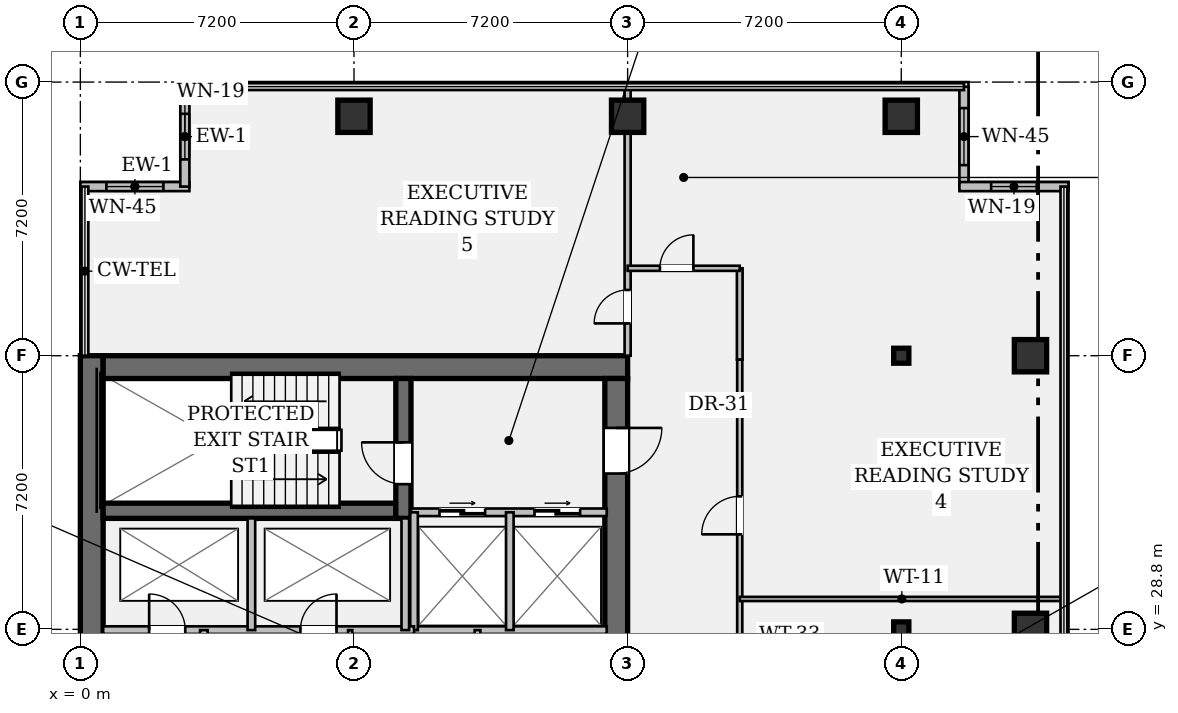
"""IFC4 building model, lengths in metres.
Left out: names, types, materials, properties, quantities, classifications, styles, units other than length and angle.
Written with IfcOpenShell. Run it as: python <this file> out.ifc"""

import sys

from ifc_helpers import new_model, si_unit, direction, frame, frame_2d, origin, origin_2d, place, context, subcontext, project, spatial, rectangle, hollow_rectangle, i_section, extrude, element, fill, save


model = new_model("IFC4")
c1 = context("Model", 3, precision=1e-05, world=origin(), true_north=direction((0.0, 1.0)))
c2 = subcontext(c1, "Body", "Model", "MODEL_VIEW")
j1 = project(units=[si_unit("LENGTHUNIT", "METRE"), si_unit("PLANEANGLEUNIT", "RADIAN")], contexts=[c1])
p1 = place(None, origin())
s1 = spatial("IfcSite", under=j1, at=p1, CompositionType="ELEMENT")
p2 = place(p1, origin())
s2 = spatial("IfcBuilding", under=s1, at=p2, CompositionType="ELEMENT")
p3 = place(p2, frame((0.0, 0.0, 152.25)))
s3 = spatial("IfcBuildingStorey", under=s2, at=p3, CompositionType="ELEMENT", Elevation=152.25)
p4 = place(p3, frame((0.3, 7.2, 0.0), z_axis=(0.0, 0.0, 1.0), x_axis=(0.0, 1.0, 0.0)))
e1 = element("IfcWall", 1, at=p4, inside=s3, PredefinedType="SHEAR", context=c2, shape_type="SweptSolid", body=[
    extrude(rectangle(XDim=28.8, YDim=0.6, at=frame_2d((14.4, 0.0))), origin(), (0.0, 0.0, 1.0), 3.58),
])
p5 = place(p3, frame((0.6, 35.7, 0.0), z_axis=(0.0, 0.0, 1.0), x_axis=(1.0, 0.0, 0.0)))
e2 = element("IfcWall", 2, at=p5, inside=s3, PredefinedType="SHEAR", context=c2, shape_type="SweptSolid", body=[
    extrude(rectangle(XDim=13.8, YDim=0.6, at=frame_2d((6.9, 0.0))), origin(), (0.0, 0.0, 1.0), 3.58),
])
p6 = place(p3, frame((14.1, 35.4, 0.0), z_axis=(0.0, 0.0, 1.0), x_axis=(0.0, -1.0, 0.0)))
e3 = element("IfcWall", 3, at=p6, inside=s3, PredefinedType="SHEAR", context=c2, shape_type="SweptSolid", body=[
    extrude(rectangle(XDim=27.6, YDim=0.6, at=frame_2d((13.8, 0.0))), origin(), (0.0, 0.0, 1.0), 3.58),
])
p7 = place(p6, frame((1.3, 0.0, 0.0)))
e4 = element("IfcOpeningElement", 4, at=p7, cuts=e3, PredefinedType="OPENING", context=c2, shape_type="SweptSolid", body=[
    extrude(rectangle(XDim=1.2, YDim=2.15, at=frame_2d((0.6, 1.075))), frame((0.0, 0.312, 0.0), z_axis=(0.0, -1.0, 0.0), x_axis=(1.0, 0.0, 0.0)), (0.0, 0.0, 1.0), 0.624),
])
p8 = place(p6, frame((25.25, 0.0, 0.0)))
e5 = element("IfcOpeningElement", 5, at=p8, cuts=e3, PredefinedType="OPENING", context=c2, shape_type="SweptSolid", body=[
    extrude(rectangle(XDim=1.2, YDim=2.15, at=frame_2d((0.6, 1.075))), frame((0.0, 0.312, 0.0), z_axis=(0.0, -1.0, 0.0), x_axis=(1.0, 0.0, 0.0)), (0.0, 0.0, 1.0), 0.624),
])
p9 = place(p6, frame((14.6, 0.0, 0.0)))
e6 = element("IfcOpeningElement", 6, at=p9, cuts=e3, PredefinedType="OPENING", context=c2, shape_type="SweptSolid", body=[
    extrude(rectangle(XDim=1.6, YDim=2.2, at=frame_2d((0.8, 1.1))), frame((0.0, 0.312, 0.0), z_axis=(0.0, -1.0, 0.0), x_axis=(1.0, 0.0, 0.0)), (0.0, 0.0, 1.0), 0.624),
])
p10 = place(p3, frame((0.6, 31.92, 0.0), z_axis=(0.0, 0.0, 1.0), x_axis=(1.0, 0.0, 0.0)))
e7 = element("IfcWall", 7, at=p10, inside=s3, PredefinedType="SHEAR", context=c2, shape_type="SweptSolid", body=[
    extrude(rectangle(XDim=7.7, YDim=0.4, at=frame_2d((3.85, 0.0))), origin(), (0.0, 0.0, 1.0), 3.58),
])
p11 = place(p3, frame((8.5, 31.72, 0.0), z_axis=(0.0, 0.0, 1.0), x_axis=(0.0, 1.0, 0.0)))
e8 = element("IfcWall", 8, at=p11, inside=s3, PredefinedType="SHEAR", context=c2, shape_type="SweptSolid", body=[
    extrude(rectangle(XDim=3.68, YDim=0.4, at=frame_2d((1.84, 0.0))), origin(), (0.0, 0.0, 1.0), 3.58),
])
p12 = place(p11, frame((0.9, 0.0, 0.0)))
e9 = element("IfcOpeningElement", 9, at=p12, cuts=e8, PredefinedType="OPENING", context=c2, shape_type="SweptSolid", body=[
    extrude(rectangle(XDim=1.1, YDim=2.15, at=frame_2d((0.55, 1.075))), frame((0.0, 0.212, 0.0), z_axis=(0.0, -1.0, 0.0), x_axis=(1.0, 0.0, 0.0)), (0.0, 0.0, 1.0), 0.424),
])
for number, where, z_axis, x_axis in (
    (10, (7.2, 42.3, 0.0), (0.0, 0.0, 1.0), (1.0, 0.0, 0.0)),
    (11, (14.4, 42.3, 0.0), (0.0, 0.0, 1.0), (1.0, 0.0, 0.0)),
):
    element("IfcColumn", number, at=place(p3, frame(where, z_axis=z_axis, x_axis=x_axis)), inside=s3, PredefinedType="COLUMN", context=c2, shape_type="SweptSolid", body=[
        extrude(hollow_rectangle(XDim=0.85, YDim=0.85, WallThickness=0.05, at=origin_2d()), origin(), (0.0, 0.0, 1.0), 3.58),
    ])
for number, where, z_axis, x_axis in (
    (12, (21.6, 28.8, 0.0), (0.0, 0.0, 1.0), (1.0, 0.0, 0.0)),
    (13, (21.6, 36.0, 0.0), (0.0, 0.0, 1.0), (1.0, 0.0, 0.0)),
):
    element("IfcColumn", number, at=place(p3, frame(where, z_axis=z_axis, x_axis=x_axis)), inside=s3, PredefinedType="COLUMN", context=c2, shape_type="SweptSolid", body=[
        extrude(i_section(OverallWidth=0.399, OverallDepth=0.394, WebThickness=0.023, FlangeThickness=0.037, FilletRadius=0.018, at=origin_2d()), origin(), (0.0, 0.0, 1.0), 3.58),
    ])
for number, where, z_axis, x_axis in (
    (14, (21.6, 42.3, 0.0), (0.0, 0.0, 1.0), (1.0, 0.0, 0.0)),
    (15, (25.0, 28.8, 0.0), (0.0, 0.0, 1.0), (1.0, 0.0, 0.0)),
    (16, (25.0, 36.0, 0.0), (0.0, 0.0, 1.0), (1.0, 0.0, 0.0)),
):
    element("IfcColumn", number, at=place(p3, frame(where, z_axis=z_axis, x_axis=x_axis)), inside=s3, PredefinedType="COLUMN", context=c2, shape_type="SweptSolid", body=[
        extrude(hollow_rectangle(XDim=0.85, YDim=0.85, WallThickness=0.05, at=origin_2d()), origin(), (0.0, 0.0, 1.0), 3.58),
    ])
p13 = place(p3, frame((0.0, 40.45, 0.0), z_axis=(0.0, 0.0, 1.0), x_axis=(1.0, 0.0, 0.0)))
e17 = element("IfcWall", 17, at=p13, inside=s3, PredefinedType="STANDARD", context=c2, shape_type="SweptSolid", body=[
    extrude(rectangle(XDim=2.87, YDim=0.24, at=frame_2d((1.435, 0.0))), origin(), (0.0, 0.0, 1.0), 3.58),
])
p14 = place(p13, frame((0.685, 0.0, 0.95)))
e18 = element("IfcOpeningElement", 18, at=p14, cuts=e17, PredefinedType="OPENING", context=c2, shape_type="SweptSolid", body=[
    extrude(rectangle(XDim=1.5, YDim=1.8, at=frame_2d((0.75, 0.9))), frame((0.0, 0.132, 0.0), z_axis=(0.0, -1.0, 0.0), x_axis=(1.0, 0.0, 0.0)), (0.0, 0.0, 1.0), 0.264),
])
p15 = place(p3, frame((2.75, 40.45, 0.0), z_axis=(0.0, 0.0, 1.0), x_axis=(0.0, 1.0, 0.0)))
e19 = element("IfcWall", 19, at=p15, inside=s3, PredefinedType="STANDARD", context=c2, shape_type="SweptSolid", body=[
    extrude(rectangle(XDim=2.63, YDim=0.24, at=frame_2d((1.315, 0.0))), origin(), (0.0, 0.0, 1.0), 3.58),
])
p16 = place(p15, frame((0.715, 0.0, 0.95)))
e20 = element("IfcOpeningElement", 20, at=p16, cuts=e19, PredefinedType="OPENING", context=c2, shape_type="SweptSolid", body=[
    extrude(rectangle(XDim=1.2, YDim=1.8, at=frame_2d((0.6, 0.9))), frame((0.0, 0.132, 0.0), z_axis=(0.0, -1.0, 0.0), x_axis=(1.0, 0.0, 0.0)), (0.0, 0.0, 1.0), 0.264),
])
p17 = place(p3, frame((23.25, 43.08, 0.0), z_axis=(0.0, 0.0, 1.0), x_axis=(0.0, -1.0, 0.0)))
e21 = element("IfcWall", 21, at=p17, inside=s3, PredefinedType="STANDARD", context=c2, shape_type="SweptSolid", body=[
    extrude(rectangle(XDim=2.63, YDim=0.24, at=frame_2d((1.315, 0.0))), origin(), (0.0, 0.0, 1.0), 3.58),
])
p18 = place(p17, frame((0.565, 0.0, 0.95)))
e22 = element("IfcOpeningElement", 22, at=p18, cuts=e21, PredefinedType="OPENING", context=c2, shape_type="SweptSolid", body=[
    extrude(rectangle(XDim=1.5, YDim=1.8, at=frame_2d((0.75, 0.9))), frame((0.0, 0.132, 0.0), z_axis=(0.0, -1.0, 0.0), x_axis=(1.0, 0.0, 0.0)), (0.0, 0.0, 1.0), 0.264),
])
p19 = place(p3, frame((23.13, 40.45, 0.0), z_axis=(0.0, 0.0, 1.0), x_axis=(1.0, 0.0, 0.0)))
e23 = element("IfcWall", 23, at=p19, inside=s3, PredefinedType="STANDARD", context=c2, shape_type="SweptSolid", body=[
    extrude(rectangle(XDim=2.87, YDim=0.24, at=frame_2d((1.435, 0.0))), origin(), (0.0, 0.0, 1.0), 3.58),
])
p20 = place(p19, frame((0.835, 0.0, 0.95)))
e24 = element("IfcOpeningElement", 24, at=p20, cuts=e23, PredefinedType="OPENING", context=c2, shape_type="SweptSolid", body=[
    extrude(rectangle(XDim=1.2, YDim=1.8, at=frame_2d((0.6, 0.9))), frame((0.0, 0.132, 0.0), z_axis=(0.0, -1.0, 0.0), x_axis=(1.0, 0.0, 0.0)), (0.0, 0.0, 1.0), 0.264),
])
p21 = place(p3, frame((8.7, 31.88, 0.0), z_axis=(0.0, 0.0, 1.0), x_axis=(1.0, 0.0, 0.0)))
e25 = element("IfcWall", 25, at=p21, inside=s3, PredefinedType="PARTITIONING", context=c2, shape_type="SweptSolid", body=[
    extrude(rectangle(XDim=5.15, YDim=0.2, at=frame_2d((2.575, 0.0))), origin(), (0.0, 0.0, 1.0), 3.58),
])
p22 = place(p21, frame((0.75, 0.0, 0.0)))
e26 = element("IfcOpeningElement", 26, at=p22, cuts=e25, PredefinedType="OPENING", context=c2, shape_type="SweptSolid", body=[
    extrude(rectangle(XDim=1.2, YDim=2.2, at=frame_2d((0.6, 1.1))), frame((0.0, 0.112, 0.0), z_axis=(0.0, -1.0, 0.0), x_axis=(1.0, 0.0, 0.0)), (0.0, 0.0, 1.0), 0.224),
])
p23 = place(p21, frame((3.25, 0.0, 0.0)))
e27 = element("IfcOpeningElement", 27, at=p23, cuts=e25, PredefinedType="OPENING", context=c2, shape_type="SweptSolid", body=[
    extrude(rectangle(XDim=1.2, YDim=2.2, at=frame_2d((0.6, 1.1))), frame((0.0, 0.112, 0.0), z_axis=(0.0, -1.0, 0.0), x_axis=(1.0, 0.0, 0.0)), (0.0, 0.0, 1.0), 0.224),
])
p24 = place(p3, frame((8.7, 28.78, 0.0), z_axis=(0.0, 0.0, 1.0), x_axis=(1.0, 0.0, 0.0)))
e28 = element("IfcWall", 28, at=p24, inside=s3, PredefinedType="PARTITIONING", context=c2, shape_type="SweptSolid", body=[
    extrude(rectangle(XDim=5.15, YDim=0.2, at=frame_2d((2.575, 0.0))), origin(), (0.0, 0.0, 1.0), 3.58),
])
for number, where, z_axis, x_axis in (
    (29, (8.78, 28.78, 0.0), (0.0, 0.0, 1.0), (0.0, 1.0, 0.0)),
    (30, (11.3, 28.78, 0.0), (0.0, 0.0, 1.0), (0.0, 1.0, 0.0)),
):
    element("IfcWall", number, at=place(p3, frame(where, z_axis=z_axis, x_axis=x_axis)), inside=s3, PredefinedType="PARTITIONING", context=c2, shape_type="SweptSolid", body=[
        extrude(rectangle(XDim=3.1, YDim=0.2, at=frame_2d((1.55, 0.0))), origin(), (0.0, 0.0, 1.0), 3.58),
    ])
p25 = place(p3, frame((0.6, 28.78, 0.0), z_axis=(0.0, 0.0, 1.0), x_axis=(1.0, 0.0, 0.0)))
e31 = element("IfcWall", 31, at=p25, inside=s3, PredefinedType="PARTITIONING", context=c2, shape_type="SweptSolid", body=[
    extrude(rectangle(XDim=8.18, YDim=0.2, at=frame_2d((4.09, 0.0))), origin(), (0.0, 0.0, 1.0), 3.58),
])
p26 = place(p25, frame((1.21, 0.0, 0.0)))
e32 = element("IfcOpeningElement", 32, at=p26, cuts=e31, PredefinedType="OPENING", context=c2, shape_type="SweptSolid", body=[
    extrude(rectangle(XDim=0.95, YDim=2.15, at=frame_2d((0.475, 1.075))), frame((0.0, 0.112, 0.0), z_axis=(0.0, -1.0, 0.0), x_axis=(1.0, 0.0, 0.0)), (0.0, 0.0, 1.0), 0.224),
])
p27 = place(p25, frame((5.19, 0.0, 0.0)))
e33 = element("IfcOpeningElement", 33, at=p27, cuts=e31, PredefinedType="OPENING", context=c2, shape_type="SweptSolid", body=[
    extrude(rectangle(XDim=0.95, YDim=2.15, at=frame_2d((0.475, 1.075))), frame((0.0, 0.112, 0.0), z_axis=(0.0, -1.0, 0.0), x_axis=(1.0, 0.0, 0.0)), (0.0, 0.0, 1.0), 0.224),
])
for number, where, z_axis, x_axis in (
    (34, (4.5, 28.78, 0.0), (0.0, 0.0, 1.0), (0.0, 1.0, 0.0)),
    (35, (8.55, 28.78, 0.0), (0.0, 0.0, 1.0), (0.0, 1.0, 0.0)),
):
    element("IfcWall", number, at=place(p3, frame(where, z_axis=z_axis, x_axis=x_axis)), inside=s3, PredefinedType="PARTITIONING", context=c2, shape_type="SweptSolid", body=[
        extrude(rectangle(XDim=2.94, YDim=0.2, at=frame_2d((1.47, 0.0))), origin(), (0.0, 0.0, 1.0), 3.58),
    ])
p28 = place(p3, frame((3.25, 15.7, 0.0), z_axis=(0.0, 0.0, 1.0), x_axis=(0.0, 1.0, 0.0)))
e36 = element("IfcWall", 36, at=p28, inside=s3, PredefinedType="PARTITIONING", context=c2, shape_type="SweptSolid", body=[
    extrude(rectangle(XDim=13.08, YDim=0.2, at=frame_2d((6.54, 0.0))), origin(), (0.0, 0.0, 1.0), 3.58),
])
p29 = place(p3, frame((7.1, 22.2, 0.0), z_axis=(0.0, 0.0, 1.0), x_axis=(0.0, 1.0, 0.0)))
e37 = element("IfcWall", 37, at=p29, inside=s3, PredefinedType="PARTITIONING", context=c2, shape_type="SweptSolid", body=[
    extrude(rectangle(XDim=6.58, YDim=0.11, at=frame_2d((3.29, 0.0))), origin(), (0.0, 0.0, 1.0), 3.58),
])
p30 = place(p3, frame((10.45, 22.2, 0.0), z_axis=(0.0, 0.0, 1.0), x_axis=(0.0, 1.0, 0.0)))
e38 = element("IfcWall", 38, at=p30, inside=s3, PredefinedType="PARTITIONING", context=c2, shape_type="SweptSolid", body=[
    extrude(rectangle(XDim=6.58, YDim=0.15, at=frame_2d((3.29, 0.0))), origin(), (0.0, 0.0, 1.0), 3.58),
])
p31 = place(p3, frame((17.35, 20.7, 0.0), z_axis=(0.0, 0.0, 1.0), x_axis=(0.0, 1.0, 0.0)))
e39 = element("IfcWall", 39, at=p31, inside=s3, PredefinedType="PARTITIONING", context=c2, shape_type="SweptSolid", body=[
    extrude(rectangle(XDim=15.2, YDim=0.135, at=frame_2d((7.6, 0.0))), origin(), (0.0, 0.0, 1.0), 2.869),
])
p32 = place(p31, frame((5.2, 0.0, 0.0)))
e40 = element("IfcOpeningElement", 40, at=p32, cuts=e39, PredefinedType="OPENING", context=c2, shape_type="SweptSolid", body=[
    extrude(rectangle(XDim=0.88, YDim=2.15, at=frame_2d((0.44, 1.075))), frame((0.0, 0.08, 0.0), z_axis=(0.0, -1.0, 0.0), x_axis=(1.0, 0.0, 0.0)), (0.0, 0.0, 1.0), 0.159),
])
p33 = place(p31, frame((10.6, 0.0, 0.0)))
e41 = element("IfcOpeningElement", 41, at=p33, cuts=e39, PredefinedType="OPENING", context=c2, shape_type="SweptSolid", body=[
    extrude(rectangle(XDim=1.0, YDim=2.15, at=frame_2d((0.5, 1.075))), frame((0.0, 0.08, 0.0), z_axis=(0.0, -1.0, 0.0), x_axis=(1.0, 0.0, 0.0)), (0.0, 0.0, 1.0), 0.159),
])
p34 = place(p3, frame((17.35, 29.6, 0.0), z_axis=(0.0, 0.0, 1.0), x_axis=(1.0, 0.0, 0.0)))
e42 = element("IfcWall", 42, at=p34, inside=s3, PredefinedType="PARTITIONING", context=c2, shape_type="SweptSolid", body=[
    extrude(rectangle(XDim=8.53, YDim=0.11, at=frame_2d((4.265, 0.0))), origin(), (0.0, 0.0, 1.0), 2.869),
])
p35 = place(p3, frame((14.4, 36.0, 0.0), z_axis=(0.0, 0.0, 1.0), x_axis=(0.0, 1.0, 0.0)))
e43 = element("IfcWall", 43, at=p35, inside=s3, PredefinedType="PARTITIONING", context=c2, shape_type="SweptSolid", body=[
    extrude(rectangle(XDim=7.08, YDim=0.16, at=frame_2d((3.54, 0.0))), origin(), (0.0, 0.0, 1.0), 2.869),
])
p36 = place(p35, frame((0.85, 0.0, 0.0)))
e44 = element("IfcOpeningElement", 44, at=p36, cuts=e43, PredefinedType="OPENING", context=c2, shape_type="SweptSolid", body=[
    extrude(rectangle(XDim=0.88, YDim=2.15, at=frame_2d((0.44, 1.075))), frame((0.0, 0.092, 0.0), z_axis=(0.0, -1.0, 0.0), x_axis=(1.0, 0.0, 0.0)), (0.0, 0.0, 1.0), 0.184),
])
p37 = place(p3, frame((17.35, 35.9, 0.0), z_axis=(0.0, 0.0, 1.0), x_axis=(0.0, 1.0, 0.0)))
e45 = element("IfcWall", 45, at=p37, inside=s3, PredefinedType="PARTITIONING", context=c2, shape_type="SweptSolid", body=[
    extrude(rectangle(XDim=2.4, YDim=0.15, at=frame_2d((1.2, 0.0))), origin(), (0.0, 0.0, 1.0), 2.869),
])
p38 = place(p3, frame((14.4, 38.3, 0.0), z_axis=(0.0, 0.0, 1.0), x_axis=(1.0, 0.0, 0.0)))
e46 = element("IfcWall", 46, at=p38, inside=s3, PredefinedType="PARTITIONING", context=c2, shape_type="SweptSolid", body=[
    extrude(rectangle(XDim=2.95, YDim=0.135, at=frame_2d((1.475, 0.0))), origin(), (0.0, 0.0, 1.0), 3.148),
])
p39 = place(p38, frame((0.85, 0.0, 0.0)))
e47 = element("IfcOpeningElement", 47, at=p39, cuts=e46, PredefinedType="OPENING", context=c2, shape_type="SweptSolid", body=[
    extrude(rectangle(XDim=0.88, YDim=2.15, at=frame_2d((0.44, 1.075))), frame((0.0, 0.08, 0.0), z_axis=(0.0, -1.0, 0.0), x_axis=(1.0, 0.0, 0.0)), (0.0, 0.0, 1.0), 0.159),
])
p40 = place(p14, origin())
e48 = element("IfcWindow", 48, at=p40, inside=s3, PartitioningType="SINGLE_PANEL", PredefinedType="WINDOW", context=c2, shape_type="SweptSolid", body=[
    extrude(rectangle(XDim=1.5, YDim=1.8, at=frame_2d((0.75, 0.9))), frame((0.0, 0.03, 0.0), z_axis=(0.0, -1.0, 0.0), x_axis=(1.0, 0.0, 0.0)), (0.0, 0.0, 1.0), 0.06),
])
fill(e18, e48)
p41 = place(p16, origin())
e49 = element("IfcWindow", 49, at=p41, inside=s3, PartitioningType="SINGLE_PANEL", PredefinedType="WINDOW", context=c2, shape_type="SweptSolid", body=[
    extrude(rectangle(XDim=1.2, YDim=1.8, at=frame_2d((0.6, 0.9))), frame((0.0, 0.03, 0.0), z_axis=(0.0, -1.0, 0.0), x_axis=(1.0, 0.0, 0.0)), (0.0, 0.0, 1.0), 0.06),
])
fill(e20, e49)
p42 = place(p18, origin())
e50 = element("IfcWindow", 50, at=p42, inside=s3, PartitioningType="SINGLE_PANEL", PredefinedType="WINDOW", context=c2, shape_type="SweptSolid", body=[
    extrude(rectangle(XDim=1.5, YDim=1.8, at=frame_2d((0.75, 0.9))), frame((0.0, 0.03, 0.0), z_axis=(0.0, -1.0, 0.0), x_axis=(1.0, 0.0, 0.0)), (0.0, 0.0, 1.0), 0.06),
])
fill(e22, e50)
p43 = place(p20, origin())
e51 = element("IfcWindow", 51, at=p43, inside=s3, PartitioningType="SINGLE_PANEL", PredefinedType="WINDOW", context=c2, shape_type="SweptSolid", body=[
    extrude(rectangle(XDim=1.2, YDim=1.8, at=frame_2d((0.6, 0.9))), frame((0.0, 0.03, 0.0), z_axis=(0.0, -1.0, 0.0), x_axis=(1.0, 0.0, 0.0)), (0.0, 0.0, 1.0), 0.06),
])
fill(e24, e51)
p44 = place(p12, origin())
e52 = element("IfcDoor", 52, at=p44, inside=s3, OperationType="SINGLE_SWING_RIGHT", PredefinedType="DOOR", context=c2, shape_type="SweptSolid", body=[
    extrude(rectangle(XDim=1.1, YDim=2.15, at=frame_2d((0.55, 1.075))), frame((0.0, 0.025, 0.0), z_axis=(0.0, -1.0, 0.0), x_axis=(1.0, 0.0, 0.0)), (0.0, 0.0, 1.0), 0.05),
])
fill(e9, e52)
p45 = place(p7, origin())
e53 = element("IfcDoor", 53, at=p45, inside=s3, OperationType="SINGLE_SWING_LEFT", PredefinedType="DOOR", context=c2, shape_type="SweptSolid", body=[
    extrude(rectangle(XDim=1.2, YDim=2.15, at=frame_2d((0.6, 1.075))), frame((0.0, 0.025, 0.0), z_axis=(0.0, -1.0, 0.0), x_axis=(1.0, 0.0, 0.0)), (0.0, 0.0, 1.0), 0.05),
])
fill(e4, e53)
p46 = place(p22, origin())
e54 = element("IfcDoor", 54, at=p46, inside=s3, OperationType="DOUBLE_DOOR_SLIDING", PredefinedType="DOOR", context=c2, shape_type="SweptSolid", body=[
    extrude(rectangle(XDim=1.2, YDim=2.2, at=frame_2d((0.6, 1.1))), frame((0.0, 0.025, 0.0), z_axis=(0.0, -1.0, 0.0), x_axis=(1.0, 0.0, 0.0)), (0.0, 0.0, 1.0), 0.05),
])
fill(e26, e54)
p47 = place(p23, origin())
e55 = element("IfcDoor", 55, at=p47, inside=s3, OperationType="DOUBLE_DOOR_SLIDING", PredefinedType="DOOR", context=c2, shape_type="SweptSolid", body=[
    extrude(rectangle(XDim=1.2, YDim=2.2, at=frame_2d((0.6, 1.1))), frame((0.0, 0.025, 0.0), z_axis=(0.0, -1.0, 0.0), x_axis=(1.0, 0.0, 0.0)), (0.0, 0.0, 1.0), 0.05),
])
fill(e27, e55)
p48 = place(p26, origin())
e56 = element("IfcDoor", 56, at=p48, inside=s3, OperationType="SINGLE_SWING_LEFT", PredefinedType="DOOR", context=c2, shape_type="SweptSolid", body=[
    extrude(rectangle(XDim=0.95, YDim=2.15, at=frame_2d((0.475, 1.075))), frame((0.0, 0.025, 0.0), z_axis=(0.0, -1.0, 0.0), x_axis=(1.0, 0.0, 0.0)), (0.0, 0.0, 1.0), 0.05),
])
fill(e32, e56)
p49 = place(p27, origin())
e57 = element("IfcDoor", 57, at=p49, inside=s3, OperationType="SINGLE_SWING_RIGHT", PredefinedType="DOOR", context=c2, shape_type="SweptSolid", body=[
    extrude(rectangle(XDim=0.95, YDim=2.15, at=frame_2d((0.475, 1.075))), frame((0.0, 0.025, 0.0), z_axis=(0.0, -1.0, 0.0), x_axis=(1.0, 0.0, 0.0)), (0.0, 0.0, 1.0), 0.05),
])
fill(e33, e57)
p50 = place(p33, origin())
e58 = element("IfcDoor", 58, at=p50, inside=s3, OperationType="SINGLE_SWING_LEFT", PredefinedType="DOOR", context=c2, shape_type="SweptSolid", body=[
    extrude(rectangle(XDim=1.0, YDim=2.15, at=frame_2d((0.5, 1.075))), frame((0.0, 0.025, 0.0), z_axis=(0.0, -1.0, 0.0), x_axis=(1.0, 0.0, 0.0)), (0.0, 0.0, 1.0), 0.05),
])
fill(e41, e58)
p51 = place(p36, origin())
e59 = element("IfcDoor", 59, at=p51, inside=s3, OperationType="SINGLE_SWING_LEFT", PredefinedType="DOOR", context=c2, shape_type="SweptSolid", body=[
    extrude(rectangle(XDim=0.88, YDim=2.15, at=frame_2d((0.44, 1.075))), frame((0.0, 0.025, 0.0), z_axis=(0.0, -1.0, 0.0), x_axis=(1.0, 0.0, 0.0)), (0.0, 0.0, 1.0), 0.05),
])
fill(e44, e59)
p52 = place(p39, origin())
e60 = element("IfcDoor", 60, at=p52, inside=s3, OperationType="SINGLE_SWING_RIGHT", PredefinedType="DOOR", context=c2, shape_type="SweptSolid", body=[
    extrude(rectangle(XDim=0.88, YDim=2.15, at=frame_2d((0.44, 1.075))), frame((0.0, 0.025, 0.0), z_axis=(0.0, -1.0, 0.0), x_axis=(1.0, 0.0, 0.0)), (0.0, 0.0, 1.0), 0.05),
])
fill(e47, e60)
save(model, sys.argv[1])
